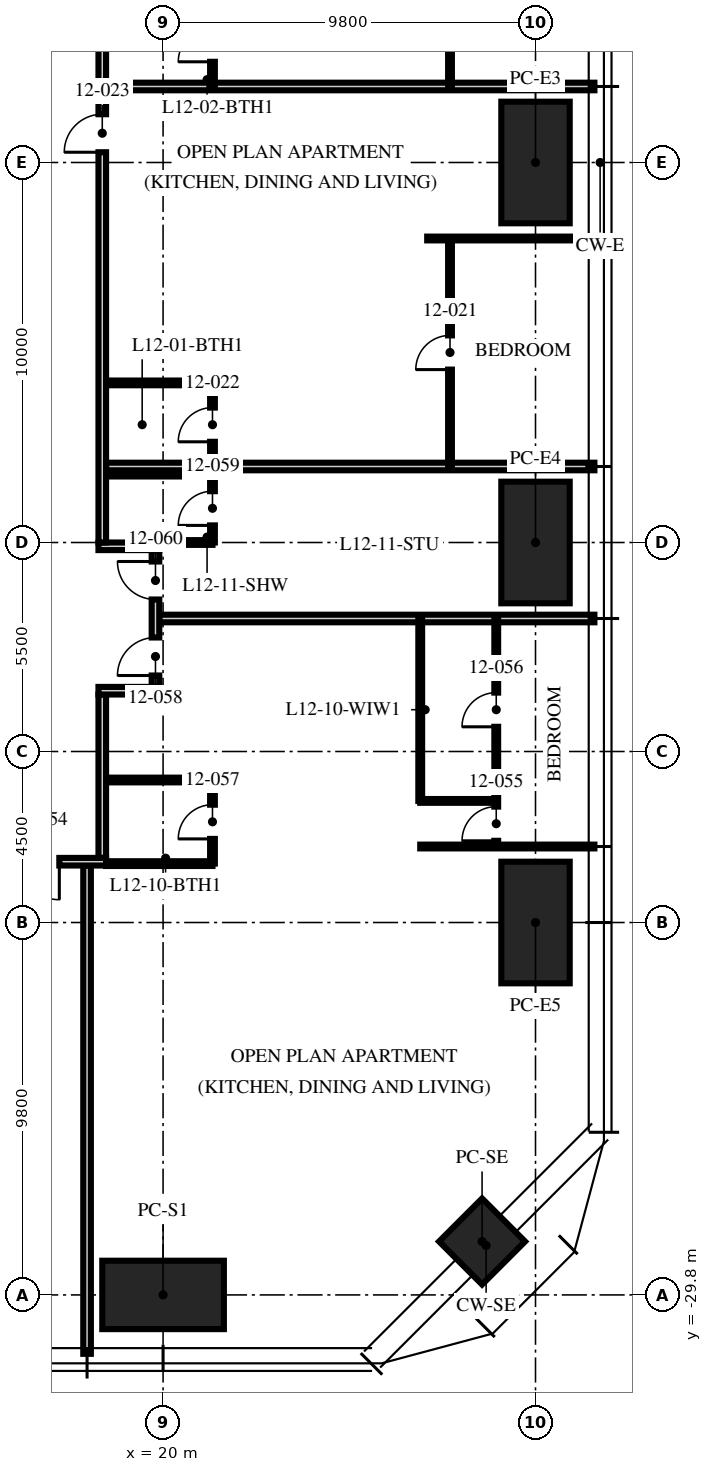
"""IFC4 building model, lengths in metres.
Left out: names, types, materials, properties, quantities, classifications, styles, units other than length and angle.
Written with IfcOpenShell. Run it as: python <this file> out.ifc"""

import sys

from ifc_helpers import new_model, si_unit, direction, frame, frame_2d, origin, origin_2d, place, context, subcontext, project, spatial, rectangle, hollow_rectangle, extrude, element, fill, save


model = new_model("IFC4")
c1 = context("Model", 3, precision=1e-05, world=origin(), true_north=direction((0.0, 1.0)))
c2 = subcontext(c1, "Body", "Model", "MODEL_VIEW")
j1 = project(units=[si_unit("LENGTHUNIT", "METRE"), si_unit("PLANEANGLEUNIT", "RADIAN")], contexts=[c1])
p1 = place(None, origin())
s1 = spatial("IfcSite", under=j1, at=p1, CompositionType="ELEMENT")
p2 = place(p1, origin())
s2 = spatial("IfcBuilding", under=s1, at=p2, CompositionType="ELEMENT")
p3 = place(p2, frame((0.0, 0.0, 51.0)))
s3 = spatial("IfcBuildingStorey", under=s2, at=p3, CompositionType="ELEMENT", Elevation=51.0)
for number, where, z_axis, x_axis in (
    (1, (29.8, 0.0, 0.0), (0.0, 0.0, 1.0), (0.0, 1.0, 0.0)),
    (2, (29.8, -10.0, 0.0), (0.0, 0.0, 1.0), (0.0, 1.0, 0.0)),
    (3, (29.8, -20.0, 0.0), (0.0, 0.0, 1.0), (0.0, 1.0, 0.0)),
    (4, (20.0, -29.8, 0.0), (0.0, 0.0, 1.0), (1.0, 0.0, 0.0)),
):
    element("IfcColumn", number, at=place(p3, frame(where, z_axis=z_axis, x_axis=x_axis)), inside=s3, PredefinedType="COLUMN", context=c2, shape_type="SweptSolid", body=[
        extrude(hollow_rectangle(XDim=3.2, YDim=1.8, WallThickness=0.2, at=origin_2d()), origin(), (0.0, 0.0, 1.0), 3.75),
    ])
p4 = place(p3, frame((28.394, -28.394, 0.0), z_axis=(0.0, 0.0, 1.0), x_axis=(0.707106781187, 0.707106781187, 0.0)))
e5 = element("IfcColumn", 5, at=p4, inside=s3, PredefinedType="COLUMN", context=c2, shape_type="SweptSolid", body=[
    extrude(hollow_rectangle(XDim=1.6, YDim=1.6, WallThickness=0.1, at=origin_2d()), origin(), (0.0, 0.0, 1.0), 3.75),
])
p5 = place(p3, frame((18.5, -8.0, 0.0), z_axis=(0.0, 0.0, 1.0), x_axis=(1.0, 0.0, 0.0)))
e6 = element("IfcWall", 6, at=p5, inside=s3, PredefinedType="PARTITIONING", context=c2, shape_type="SweptSolid", body=[
    extrude(rectangle(XDim=12.85, YDim=0.2, at=frame_2d((6.425, 0.0))), origin(), (0.0, 0.0, 1.0), 2.71),
])
p6 = place(p3, frame((26.95, -2.0, 0.0), z_axis=(0.0, 0.0, 1.0), x_axis=(1.0, 0.0, 0.0)))
e7 = element("IfcWall", 7, at=p6, inside=s3, PredefinedType="PARTITIONING", context=c2, shape_type="SweptSolid", body=[
    extrude(rectangle(XDim=4.4, YDim=0.1, at=frame_2d((2.2, 0.0))), origin(), (0.0, 0.0, 1.0), 2.71),
])
p7 = place(p3, frame((18.5, 2.0, 0.0), z_axis=(0.0, 0.0, 1.0), x_axis=(1.0, 0.0, 0.0)))
e8 = element("IfcWall", 8, at=p7, inside=s3, PredefinedType="PARTITIONING", context=c2, shape_type="SweptSolid", body=[
    extrude(rectangle(XDim=12.85, YDim=0.2, at=frame_2d((6.425, 0.0))), origin(), (0.0, 0.0, 1.0), 2.71),
])
p8 = place(p3, frame((18.0, -18.5, 0.0), z_axis=(0.0, 0.0, 1.0), x_axis=(0.0, -1.0, 0.0)))
e9 = element("IfcWall", 9, at=p8, inside=s3, PredefinedType="PARTITIONING", context=c2, shape_type="SweptSolid", body=[
    extrude(rectangle(XDim=12.85, YDim=0.2, at=frame_2d((6.425, 0.0))), origin(), (0.0, 0.0, 1.0), 2.3),
])
p9 = place(p3, frame((26.767, -18.0, 0.0), z_axis=(0.0, 0.0, 1.0), x_axis=(1.0, 0.0, 0.0)))
e10 = element("IfcWall", 10, at=p9, inside=s3, PredefinedType="PARTITIONING", context=c2, shape_type="SweptSolid", body=[
    extrude(rectangle(XDim=4.583, YDim=0.1, at=frame_2d((2.292, 0.0))), origin(), (0.0, 0.0, 1.0), 2.71),
])
p10 = place(p3, frame((19.9, -12.0, 0.0), z_axis=(0.0, 0.0, 1.0), x_axis=(1.0, 0.0, 0.0)))
e11 = element("IfcWall", 11, at=p10, inside=s3, PredefinedType="PARTITIONING", context=c2, shape_type="SweptSolid", body=[
    extrude(rectangle(XDim=11.45, YDim=0.2, at=frame_2d((5.725, 0.0))), origin(), (0.0, 0.0, 1.0), 2.71),
])
p11 = place(p3, frame((27.55, -8.0, 0.0), z_axis=(0.0, 0.0, 1.0), x_axis=(0.0, 1.0, 0.0)))
e12 = element("IfcWall", 12, at=p11, inside=s3, PredefinedType="PARTITIONING", context=c2, shape_type="SweptSolid", body=[
    extrude(rectangle(XDim=6.0, YDim=0.1, at=frame_2d((3.0, 0.0))), origin(), (0.0, 0.0, 1.0), 2.61),
])
p12 = place(p11, frame((2.55, 0.0, 0.0)))
e13 = element("IfcOpeningElement", 13, at=p12, cuts=e12, PredefinedType="OPENING", context=c2, shape_type="SweptSolid", body=[
    extrude(rectangle(XDim=0.9, YDim=2.1, at=frame_2d((0.45, 1.05))), frame((0.0, 0.06, 0.0), z_axis=(0.0, -1.0, 0.0), x_axis=(1.0, 0.0, 0.0)), (0.0, 0.0, 1.0), 0.12),
])
p13 = place(p3, frame((21.3, -8.0, 0.0), z_axis=(0.0, 0.0, 1.0), x_axis=(0.0, 1.0, 0.0)))
e14 = element("IfcWall", 14, at=p13, inside=s3, PredefinedType="PARTITIONING", context=c2, shape_type="SweptSolid", body=[
    extrude(rectangle(XDim=2.2, YDim=0.125, at=frame_2d((1.1, 0.0))), origin(), (0.0, 0.0, 1.0), 3.5),
])
p14 = place(p13, frame((0.65, 0.0, 0.0)))
e15 = element("IfcOpeningElement", 15, at=p14, cuts=e14, PredefinedType="OPENING", context=c2, shape_type="SweptSolid", body=[
    extrude(rectangle(XDim=0.9, YDim=2.1, at=frame_2d((0.45, 1.05))), frame((0.0, 0.073, 0.0), z_axis=(0.0, -1.0, 0.0), x_axis=(1.0, 0.0, 0.0)), (0.0, 0.0, 1.0), 0.145),
])
p15 = place(p3, frame((18.5, -5.8, 0.0), z_axis=(0.0, 0.0, 1.0), x_axis=(1.0, 0.0, 0.0)))
e16 = element("IfcWall", 16, at=p15, inside=s3, PredefinedType="PARTITIONING", context=c2, shape_type="SweptSolid", body=[
    extrude(rectangle(XDim=2.8, YDim=0.125, at=frame_2d((1.4, 0.0))), origin(), (0.0, 0.0, 1.0), 3.5),
])
p16 = place(p3, frame((27.55, 2.0, 0.0), z_axis=(0.0, 0.0, 1.0), x_axis=(0.0, 1.0, 0.0)))
e17 = element("IfcWall", 17, at=p16, inside=s3, PredefinedType="PARTITIONING", context=c2, shape_type="SweptSolid", body=[
    extrude(rectangle(XDim=6.0, YDim=0.1, at=frame_2d((3.0, 0.0))), origin(), (0.0, 0.0, 1.0), 2.61),
])
p17 = place(p16, frame((2.55, 0.0, 0.0)))
e18 = element("IfcOpeningElement", 18, at=p17, cuts=e17, PredefinedType="OPENING", context=c2, shape_type="SweptSolid", body=[
    extrude(rectangle(XDim=0.9, YDim=2.1, at=frame_2d((0.45, 1.05))), frame((0.0, 0.06, 0.0), z_axis=(0.0, -1.0, 0.0), x_axis=(1.0, 0.0, 0.0)), (0.0, 0.0, 1.0), 0.12),
])
p18 = place(p3, frame((21.3, 2.0, 0.0), z_axis=(0.0, 0.0, 1.0), x_axis=(0.0, 1.0, 0.0)))
e19 = element("IfcWall", 19, at=p18, inside=s3, PredefinedType="PARTITIONING", context=c2, shape_type="SweptSolid", body=[
    extrude(rectangle(XDim=4.4, YDim=0.125, at=frame_2d((2.2, 0.0))), origin(), (0.0, 0.0, 1.0), 2.61),
])
p19 = place(p18, frame((0.65, 0.0, 0.0)))
e20 = element("IfcOpeningElement", 20, at=p19, cuts=e19, PredefinedType="OPENING", context=c2, shape_type="SweptSolid", body=[
    extrude(rectangle(XDim=0.9, YDim=2.1, at=frame_2d((0.45, 1.05))), frame((0.0, 0.073, 0.0), z_axis=(0.0, -1.0, 0.0), x_axis=(1.0, 0.0, 0.0)), (0.0, 0.0, 1.0), 0.145),
])
p20 = place(p18, frame((2.85, 0.0, 0.0)))
e21 = element("IfcOpeningElement", 21, at=p20, cuts=e19, PredefinedType="OPENING", context=c2, shape_type="SweptSolid", body=[
    extrude(rectangle(XDim=0.9, YDim=2.1, at=frame_2d((0.45, 1.05))), frame((0.0, 0.073, 0.0), z_axis=(0.0, -1.0, 0.0), x_axis=(1.0, 0.0, 0.0)), (0.0, 0.0, 1.0), 0.145),
])
p21 = place(p3, frame((28.767, -18.0, 0.0), z_axis=(0.0, 0.0, 1.0), x_axis=(0.0, 1.0, 0.0)))
e22 = element("IfcWall", 22, at=p21, inside=s3, PredefinedType="PARTITIONING", context=c2, shape_type="SweptSolid", body=[
    extrude(rectangle(XDim=6.0, YDim=0.1, at=frame_2d((3.0, 0.0))), origin(), (0.0, 0.0, 1.0), 2.61),
])
p22 = place(p21, frame((0.15, 0.0, 0.0)))
e23 = element("IfcOpeningElement", 23, at=p22, cuts=e22, PredefinedType="OPENING", context=c2, shape_type="SweptSolid", body=[
    extrude(rectangle(XDim=0.9, YDim=2.1, at=frame_2d((0.45, 1.05))), frame((0.0, 0.06, 0.0), z_axis=(0.0, -1.0, 0.0), x_axis=(1.0, 0.0, 0.0)), (0.0, 0.0, 1.0), 0.12),
])
p23 = place(p21, frame((3.15, 0.0, 0.0)))
e24 = element("IfcOpeningElement", 24, at=p23, cuts=e22, PredefinedType="OPENING", context=c2, shape_type="SweptSolid", body=[
    extrude(rectangle(XDim=0.9, YDim=2.1, at=frame_2d((0.45, 1.05))), frame((0.0, 0.06, 0.0), z_axis=(0.0, -1.0, 0.0), x_axis=(1.0, 0.0, 0.0)), (0.0, 0.0, 1.0), 0.12),
])
p24 = place(p3, frame((26.767, -16.8, 0.0), z_axis=(0.0, 0.0, 1.0), x_axis=(1.0, 0.0, 0.0)))
e25 = element("IfcWall", 25, at=p24, inside=s3, PredefinedType="PARTITIONING", context=c2, shape_type="SweptSolid", body=[
    extrude(rectangle(XDim=2.0, YDim=0.1, at=frame_2d((1.0, 0.0))), origin(), (0.0, 0.0, 1.0), 3.5),
])
p25 = place(p3, frame((26.767, -16.8, 0.0), z_axis=(0.0, 0.0, 1.0), x_axis=(0.0, 1.0, 0.0)))
e26 = element("IfcWall", 26, at=p25, inside=s3, PredefinedType="PARTITIONING", context=c2, shape_type="SweptSolid", body=[
    extrude(rectangle(XDim=4.8, YDim=0.1, at=frame_2d((2.4, 0.0))), origin(), (0.0, 0.0, 1.0), 2.61),
])
p26 = place(p3, frame((21.3, -18.45, 0.0), z_axis=(0.0, 0.0, 1.0), x_axis=(0.0, 1.0, 0.0)))
e27 = element("IfcWall", 27, at=p26, inside=s3, PredefinedType="PARTITIONING", context=c2, shape_type="SweptSolid", body=[
    extrude(rectangle(XDim=2.2, YDim=0.125, at=frame_2d((1.1, 0.0))), origin(), (0.0, 0.0, 1.0), 3.5),
])
p27 = place(p26, frame((0.65, 0.0, 0.0)))
e28 = element("IfcOpeningElement", 28, at=p27, cuts=e27, PredefinedType="OPENING", context=c2, shape_type="SweptSolid", body=[
    extrude(rectangle(XDim=0.9, YDim=2.1, at=frame_2d((0.45, 1.05))), frame((0.0, 0.073, 0.0), z_axis=(0.0, -1.0, 0.0), x_axis=(1.0, 0.0, 0.0)), (0.0, 0.0, 1.0), 0.145),
])
p28 = place(p3, frame((18.5, -18.45, 0.0), z_axis=(0.0, 0.0, 1.0), x_axis=(1.0, 0.0, 0.0)))
e29 = element("IfcWall", 29, at=p28, inside=s3, PredefinedType="PARTITIONING", context=c2, shape_type="SweptSolid", body=[
    extrude(rectangle(XDim=2.8, YDim=0.125, at=frame_2d((1.4, 0.0))), origin(), (0.0, 0.0, 1.0), 2.3),
])
p29 = place(p3, frame((18.5, -16.25, 0.0), z_axis=(0.0, 0.0, 1.0), x_axis=(1.0, 0.0, 0.0)))
e30 = element("IfcWall", 30, at=p29, inside=s3, PredefinedType="PARTITIONING", context=c2, shape_type="SweptSolid", body=[
    extrude(rectangle(XDim=2.8, YDim=0.125, at=frame_2d((1.4, 0.0))), origin(), (0.0, 0.0, 1.0), 3.5),
])
p30 = place(p3, frame((21.3, -10.0, 0.0), z_axis=(0.0, 0.0, 1.0), x_axis=(0.0, 1.0, 0.0)))
e31 = element("IfcWall", 31, at=p30, inside=s3, PredefinedType="PARTITIONING", context=c2, shape_type="SweptSolid", body=[
    extrude(rectangle(XDim=1.8, YDim=0.125, at=frame_2d((0.9, 0.0))), origin(), (0.0, 0.0, 1.0), 2.492),
])
p31 = place(p30, frame((0.45, 0.0, 0.0)))
e32 = element("IfcOpeningElement", 32, at=p31, cuts=e31, PredefinedType="OPENING", context=c2, shape_type="SweptSolid", body=[
    extrude(rectangle(XDim=0.9, YDim=2.1, at=frame_2d((0.45, 1.05))), frame((0.0, 0.073, 0.0), z_axis=(0.0, -1.0, 0.0), x_axis=(1.0, 0.0, 0.0)), (0.0, 0.0, 1.0), 0.145),
])
p32 = place(p3, frame((19.97, -10.0, 0.0), z_axis=(0.0, 0.0, 1.0), x_axis=(1.0, 0.0, 0.0)))
e33 = element("IfcWall", 33, at=p32, inside=s3, PredefinedType="PARTITIONING", context=c2, shape_type="SweptSolid", body=[
    extrude(rectangle(XDim=1.33, YDim=0.125, at=frame_2d((0.665, 0.0))), origin(), (0.0, 0.0, 1.0), 2.492),
])
p33 = place(p3, frame((18.5, -8.2, 0.0), z_axis=(0.0, 0.0, 1.0), x_axis=(1.0, 0.0, 0.0)))
e34 = element("IfcWall", 34, at=p33, inside=s3, PredefinedType="PARTITIONING", context=c2, shape_type="SweptSolid", body=[
    extrude(rectangle(XDim=2.8, YDim=0.125, at=frame_2d((1.4, 0.0))), origin(), (0.0, 0.0, 1.0), 3.5),
])
p34 = place(p3, frame((18.4, -18.3, 0.0), z_axis=(0.0, 0.0, 1.0), x_axis=(0.0, 1.0, 0.0)))
e35 = element("IfcWall", 35, at=p34, inside=s3, PredefinedType="PARTITIONING", context=c2, shape_type="SweptSolid", body=[
    extrude(rectangle(XDim=4.3, YDim=0.2, at=frame_2d((2.15, 0.0))), origin(), (0.0, 0.0, 1.0), 2.3),
])
p35 = place(p3, frame((18.3, -13.9, 0.0), z_axis=(0.0, 0.0, 1.0), x_axis=(1.0, 0.0, 0.0)))
e36 = element("IfcWall", 36, at=p35, inside=s3, PredefinedType="PARTITIONING", context=c2, shape_type="SweptSolid", body=[
    extrude(rectangle(XDim=1.6, YDim=0.2, at=frame_2d((0.8, 0.0))), origin(), (0.0, 0.0, 1.0), 3.5),
])
p36 = place(p3, frame((18.3, -10.1, 0.0), z_axis=(0.0, 0.0, 1.0), x_axis=(1.0, 0.0, 0.0)))
e37 = element("IfcWall", 37, at=p36, inside=s3, PredefinedType="PARTITIONING", context=c2, shape_type="SweptSolid", body=[
    extrude(rectangle(XDim=1.6, YDim=0.2, at=frame_2d((0.8, 0.0))), origin(), (0.0, 0.0, 1.0), 2.492),
])
p37 = place(p3, frame((19.8, -13.8, 0.0), z_axis=(0.0, 0.0, 1.0), x_axis=(0.0, 1.0, 0.0)))
e38 = element("IfcWall", 38, at=p37, inside=s3, PredefinedType="PARTITIONING", context=c2, shape_type="SweptSolid", body=[
    extrude(rectangle(XDim=3.6, YDim=0.2, at=frame_2d((1.8, 0.0))), origin(), (0.0, 0.0, 1.0), 3.5),
])
p38 = place(p37, frame((0.3, 0.0, 0.0)))
e39 = element("IfcOpeningElement", 39, at=p38, cuts=e38, PredefinedType="OPENING", context=c2, shape_type="SweptSolid", body=[
    extrude(rectangle(XDim=1.0, YDim=2.2, at=frame_2d((0.5, 1.1))), frame((0.0, 0.11, 0.0), z_axis=(0.0, -1.0, 0.0), x_axis=(1.0, 0.0, 0.0)), (0.0, 0.0, 1.0), 0.22),
])
p39 = place(p37, frame((2.3, 0.0, 0.0)))
e40 = element("IfcOpeningElement", 40, at=p39, cuts=e38, PredefinedType="OPENING", context=c2, shape_type="SweptSolid", body=[
    extrude(rectangle(XDim=1.0, YDim=2.2, at=frame_2d((0.5, 1.1))), frame((0.0, 0.11, 0.0), z_axis=(0.0, -1.0, 0.0), x_axis=(1.0, 0.0, 0.0)), (0.0, 0.0, 1.0), 0.22),
])
p40 = place(p3, frame((18.4, -10.0, 0.0), z_axis=(0.0, 0.0, 1.0), x_axis=(0.0, 1.0, 0.0)))
e41 = element("IfcWall", 41, at=p40, inside=s3, PredefinedType="PARTITIONING", context=c2, shape_type="SweptSolid", body=[
    extrude(rectangle(XDim=28.3, YDim=0.2, at=frame_2d((14.15, 0.0))), origin(), (0.0, 0.0, 1.0), 2.3),
])
p41 = place(p40, frame((10.27, 0.0, 0.0)))
e42 = element("IfcOpeningElement", 42, at=p41, cuts=e41, PredefinedType="OPENING", context=c2, shape_type="SweptSolid", body=[
    extrude(rectangle(XDim=1.0, YDim=2.2, at=frame_2d((0.5, 1.1))), frame((0.0, 0.11, 0.0), z_axis=(0.0, -1.0, 0.0), x_axis=(1.0, 0.0, 0.0)), (0.0, 0.0, 1.0), 0.22),
])
p42 = place(p40, frame((26.52, 0.0, 0.0)))
e43 = element("IfcOpeningElement", 43, at=p42, cuts=e41, PredefinedType="OPENING", context=c2, shape_type="SweptSolid", body=[
    extrude(rectangle(XDim=1.0, YDim=2.2, at=frame_2d((0.5, 1.1))), frame((0.0, 0.11, 0.0), z_axis=(0.0, -1.0, 0.0), x_axis=(1.0, 0.0, 0.0)), (0.0, 0.0, 1.0), 0.22),
])
p43 = place(p3, frame((18.5, -18.4, 0.0), z_axis=(0.0, 0.0, 1.0), x_axis=(-1.0, 0.0, 0.0)))
e44 = element("IfcWall", 44, at=p43, inside=s3, PredefinedType="PARTITIONING", context=c2, shape_type="SweptSolid", body=[
    extrude(rectangle(XDim=37.0, YDim=0.2, at=frame_2d((18.5, 0.0))), origin(), (0.0, 0.0, 1.0), 2.3),
])
p44 = place(p43, frame((1.23, 0.0, 0.0)))
e45 = element("IfcOpeningElement", 45, at=p44, cuts=e44, PredefinedType="OPENING", context=c2, shape_type="SweptSolid", body=[
    extrude(rectangle(XDim=1.0, YDim=2.2, at=frame_2d((0.5, 1.1))), frame((0.0, 0.11, 0.0), z_axis=(0.0, -1.0, 0.0), x_axis=(1.0, 0.0, 0.0)), (0.0, 0.0, 1.0), 0.22),
])
p45 = place(p12, origin())
e46 = element("IfcDoor", 46, at=p45, inside=s3, OperationType="SINGLE_SWING_LEFT", PredefinedType="DOOR", context=c2, shape_type="SweptSolid", body=[
    extrude(rectangle(XDim=0.9, YDim=2.1, at=frame_2d((0.45, 1.05))), frame((0.0, 0.025, 0.0), z_axis=(0.0, -1.0, 0.0), x_axis=(1.0, 0.0, 0.0)), (0.0, 0.0, 1.0), 0.05),
])
fill(e13, e46)
p46 = place(p14, origin())
e47 = element("IfcDoor", 47, at=p46, inside=s3, OperationType="SINGLE_SWING_LEFT", PredefinedType="DOOR", context=c2, shape_type="SweptSolid", body=[
    extrude(rectangle(XDim=0.9, YDim=2.1, at=frame_2d((0.45, 1.05))), frame((0.0, 0.025, 0.0), z_axis=(0.0, -1.0, 0.0), x_axis=(1.0, 0.0, 0.0)), (0.0, 0.0, 1.0), 0.05),
])
fill(e15, e47)
p47 = place(p41, origin())
e48 = element("IfcDoor", 48, at=p47, inside=s3, OperationType="SINGLE_SWING_LEFT", PredefinedType="DOOR", context=c2, shape_type="SweptSolid", body=[
    extrude(rectangle(XDim=1.0, YDim=2.2, at=frame_2d((0.5, 1.1))), frame((0.0, 0.025, 0.0), z_axis=(0.0, -1.0, 0.0), x_axis=(1.0, 0.0, 0.0)), (0.0, 0.0, 1.0), 0.05),
])
fill(e42, e48)
p48 = place(p19, origin())
e49 = element("IfcDoor", 49, at=p48, inside=s3, OperationType="SINGLE_SWING_LEFT", PredefinedType="DOOR", context=c2, shape_type="SweptSolid", body=[
    extrude(rectangle(XDim=0.9, YDim=2.1, at=frame_2d((0.45, 1.05))), frame((0.0, 0.025, 0.0), z_axis=(0.0, -1.0, 0.0), x_axis=(1.0, 0.0, 0.0)), (0.0, 0.0, 1.0), 0.05),
])
fill(e20, e49)
p49 = place(p44, origin())
e50 = element("IfcDoor", 50, at=p49, inside=s3, OperationType="SINGLE_SWING_LEFT", PredefinedType="DOOR", context=c2, shape_type="SweptSolid", body=[
    extrude(rectangle(XDim=1.0, YDim=2.2, at=frame_2d((0.5, 1.1))), frame((0.0, 0.025, 0.0), z_axis=(0.0, -1.0, 0.0), x_axis=(1.0, 0.0, 0.0)), (0.0, 0.0, 1.0), 0.05),
])
fill(e45, e50)
p50 = place(p22, origin())
e51 = element("IfcDoor", 51, at=p50, inside=s3, OperationType="SINGLE_SWING_LEFT", PredefinedType="DOOR", context=c2, shape_type="SweptSolid", body=[
    extrude(rectangle(XDim=0.9, YDim=2.1, at=frame_2d((0.45, 1.05))), frame((0.0, 0.025, 0.0), z_axis=(0.0, -1.0, 0.0), x_axis=(1.0, 0.0, 0.0)), (0.0, 0.0, 1.0), 0.05),
])
fill(e23, e51)
p51 = place(p23, origin())
e52 = element("IfcDoor", 52, at=p51, inside=s3, OperationType="SINGLE_SWING_LEFT", PredefinedType="DOOR", context=c2, shape_type="SweptSolid", body=[
    extrude(rectangle(XDim=0.9, YDim=2.1, at=frame_2d((0.45, 1.05))), frame((0.0, 0.025, 0.0), z_axis=(0.0, -1.0, 0.0), x_axis=(1.0, 0.0, 0.0)), (0.0, 0.0, 1.0), 0.05),
])
fill(e24, e52)
p52 = place(p27, origin())
e53 = element("IfcDoor", 53, at=p52, inside=s3, OperationType="SINGLE_SWING_LEFT", PredefinedType="DOOR", context=c2, shape_type="SweptSolid", body=[
    extrude(rectangle(XDim=0.9, YDim=2.1, at=frame_2d((0.45, 1.05))), frame((0.0, 0.025, 0.0), z_axis=(0.0, -1.0, 0.0), x_axis=(1.0, 0.0, 0.0)), (0.0, 0.0, 1.0), 0.05),
])
fill(e28, e53)
p53 = place(p38, origin())
e54 = element("IfcDoor", 54, at=p53, inside=s3, OperationType="SINGLE_SWING_LEFT", PredefinedType="DOOR", context=c2, shape_type="SweptSolid", body=[
    extrude(rectangle(XDim=1.0, YDim=2.2, at=frame_2d((0.5, 1.1))), frame((0.0, 0.025, 0.0), z_axis=(0.0, -1.0, 0.0), x_axis=(1.0, 0.0, 0.0)), (0.0, 0.0, 1.0), 0.05),
])
fill(e39, e54)
p54 = place(p31, origin())
e55 = element("IfcDoor", 55, at=p54, inside=s3, OperationType="SINGLE_SWING_LEFT", PredefinedType="DOOR", context=c2, shape_type="SweptSolid", body=[
    extrude(rectangle(XDim=0.9, YDim=2.1, at=frame_2d((0.45, 1.05))), frame((0.0, 0.025, 0.0), z_axis=(0.0, -1.0, 0.0), x_axis=(1.0, 0.0, 0.0)), (0.0, 0.0, 1.0), 0.05),
])
fill(e32, e55)
p55 = place(p39, origin())
e56 = element("IfcDoor", 56, at=p55, inside=s3, OperationType="SINGLE_SWING_RIGHT", PredefinedType="DOOR", context=c2, shape_type="SweptSolid", body=[
    extrude(rectangle(XDim=1.0, YDim=2.2, at=frame_2d((0.5, 1.1))), frame((0.0, 0.025, 0.0), z_axis=(0.0, -1.0, 0.0), x_axis=(1.0, 0.0, 0.0)), (0.0, 0.0, 1.0), 0.05),
])
fill(e40, e56)
save(model, sys.argv[1])
